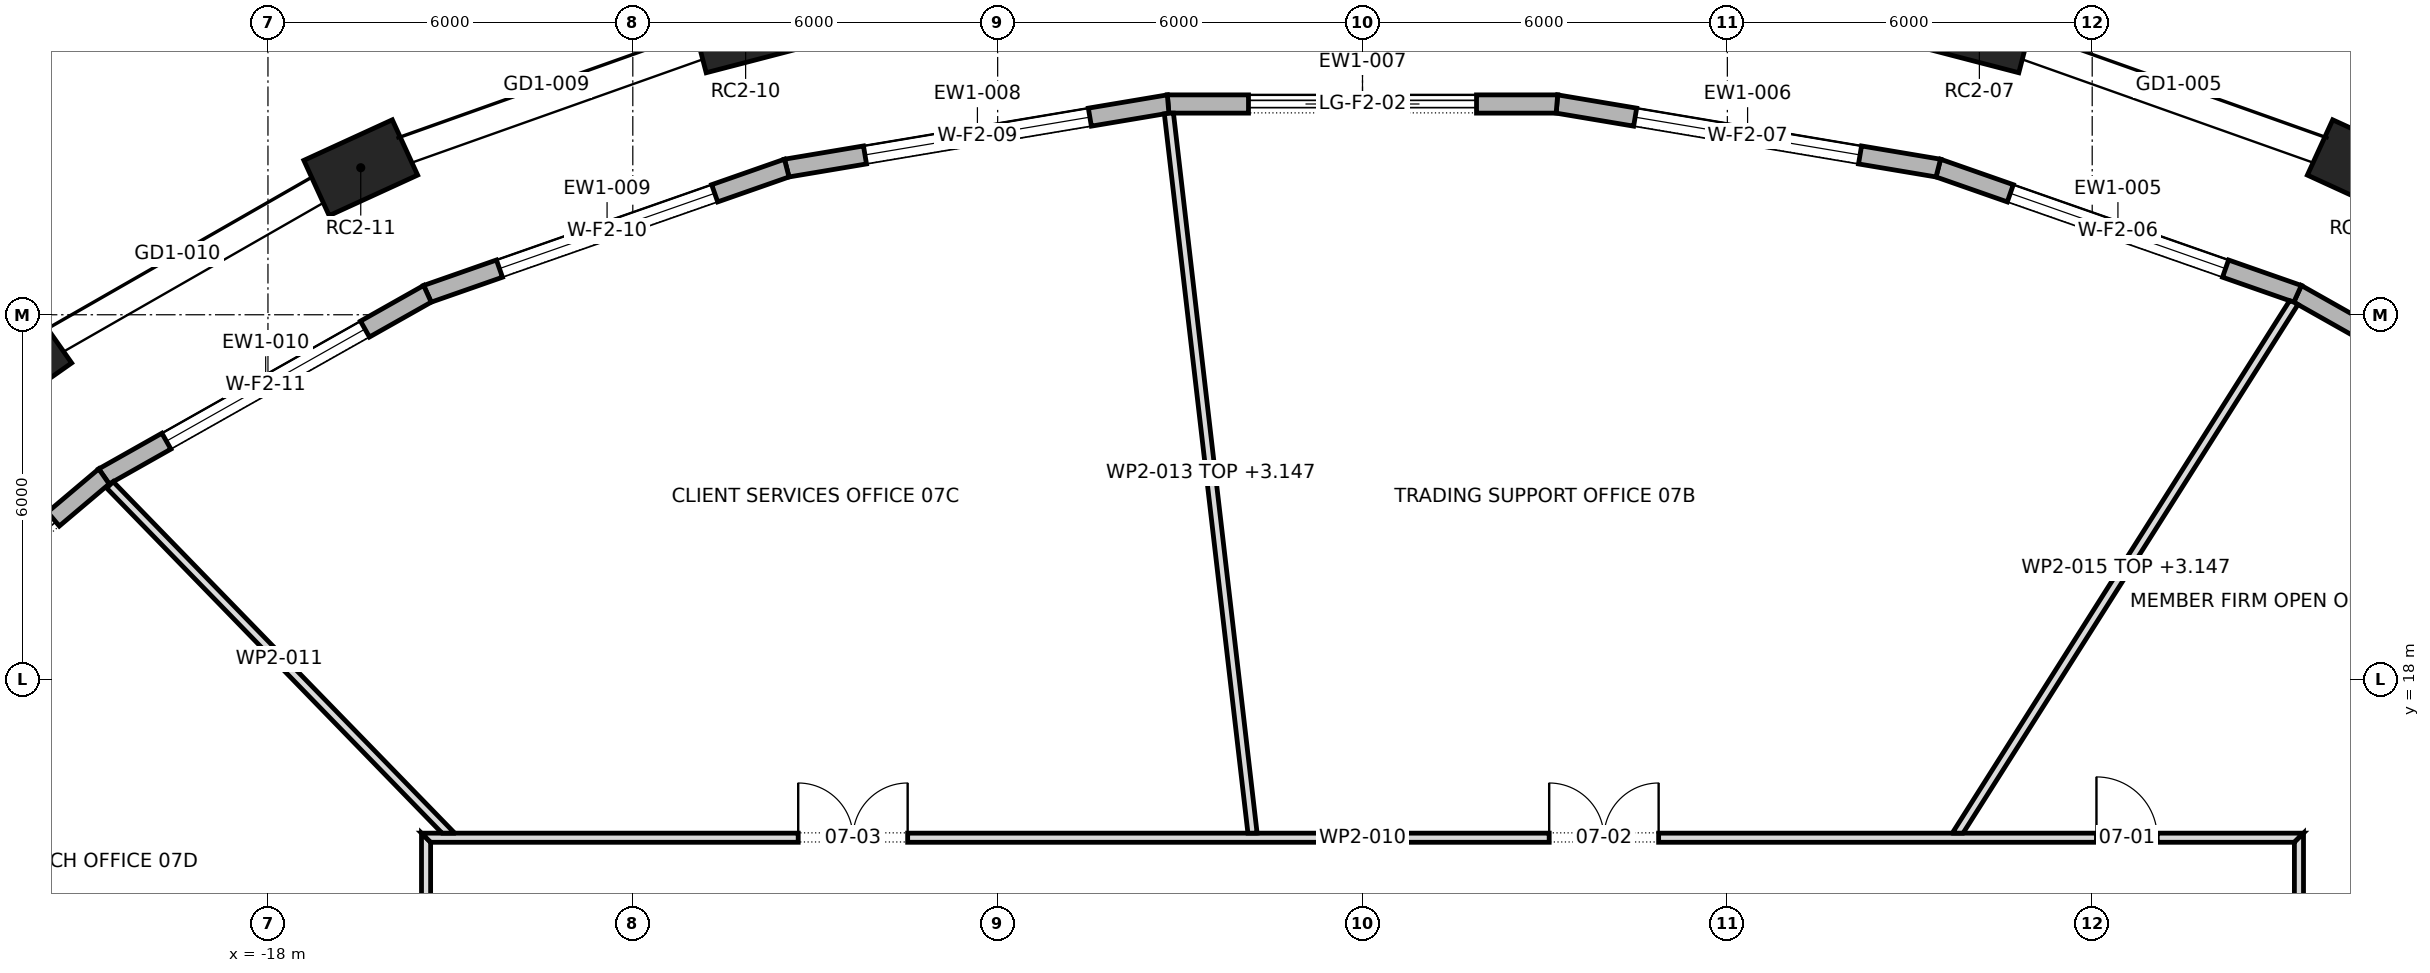
"""IFC4 building model, lengths in metres.
Left out: names, types, materials, properties, quantities, classifications, styles, units other than length and angle.
Written with IfcOpenShell. Run it as: python <this file> out.ifc"""

import sys

from ifc_helpers import new_model, si_unit, direction, frame, frame_2d, origin, origin_2d, place, context, subcontext, project, spatial, polyline, rectangle, outline, extrude, element, fill, save


model = new_model("IFC4")
c1 = context("Model", 3, precision=1e-05, world=origin(), true_north=direction((0.0, 1.0)))
c2 = subcontext(c1, "Body", "Model", "MODEL_VIEW")
j1 = project(units=[si_unit("LENGTHUNIT", "METRE"), si_unit("PLANEANGLEUNIT", "RADIAN")], contexts=[c1])
p1 = place(None, origin())
s1 = spatial("IfcSite", under=j1, at=p1, CompositionType="ELEMENT")
p2 = place(p1, origin())
s2 = spatial("IfcBuilding", under=s1, at=p2, CompositionType="ELEMENT")
p3 = place(p2, frame((0.0, 0.0, 112.9)))
s3 = spatial("IfcBuildingStorey", under=s2, at=p3, CompositionType="ELEMENT", Elevation=112.9)
for number, where, z_axis, x_axis in (
    (1, (16.474, 26.418, 0.0), (0.0, 0.0, 1.0), (-0.909, 0.417, 0.0)),
    (2, (10.145, 28.665, 0.0), (0.0, 0.0, 1.0), (-0.968, 0.252, 0.0)),
    (3, (-10.145, 28.665, 0.0), (0.0, 0.0, 1.0), (-0.968, -0.252, 0.0)),
    (4, (-16.474, 26.418, 0.0), (0.0, 0.0, 1.0), (-0.909, -0.417, 0.0)),
    (5, (-22.17, 23.156, 0.0), (0.0, 0.0, 1.0), (-0.818, -0.575, 0.0)),
):
    element("IfcColumn", number, at=place(p3, frame(where, z_axis=z_axis, x_axis=x_axis)), inside=s3, PredefinedType="COLUMN", context=c2, shape_type="SweptSolid", body=[
        extrude(rectangle(XDim=1.6, YDim=1.0, at=origin_2d()), origin(), (0.0, 0.0, 1.0), 4.2),
    ])
p4 = place(p3, frame((20.697, 21.341, 0.0), z_axis=(0.0, 0.0, 1.0), x_axis=(-0.870828448417, 0.491587035455, 0.0)))
e6 = element("IfcWall", 6, at=p4, inside=s3, PredefinedType="STANDARD", context=c2, shape_type="SweptSolid", body=[
    extrude(outline(polyline([(-0.014, -0.15), (6.122, -0.15), (6.095, 0.15), (0.014, 0.15), (-0.014, -0.15)])), origin(), (0.0, 0.0, 1.0), 3.9),
])
p5 = place(p4, frame((1.179, 0.0, 0.6)))
e7 = element("IfcOpeningElement", 7, at=p5, cuts=e6, PredefinedType="OPENING", context=c2, shape_type="SweptSolid", body=[
    extrude(rectangle(XDim=3.75, YDim=2.85, at=frame_2d((1.875, 1.425))), frame((0.0, 0.162, 0.0), z_axis=(0.0, -1.0, 0.0), x_axis=(1.0, 0.0, 0.0)), (0.0, 0.0, 1.0), 0.324),
])
p6 = place(p3, frame((15.377, 24.344, 0.0), z_axis=(0.0, 0.0, 1.0), x_axis=(-0.943866868202, 0.330326104193, 0.0)))
e8 = element("IfcWall", 8, at=p6, inside=s3, PredefinedType="STANDARD", context=c2, shape_type="SweptSolid", body=[
    extrude(outline(polyline([(-0.013, -0.15), (6.273, -0.15), (6.247, 0.15), (0.013, 0.15), (-0.013, -0.15)])), origin(), (0.0, 0.0, 1.0), 3.9),
])
p7 = place(p6, frame((1.255, 0.0, 0.6)))
e9 = element("IfcOpeningElement", 9, at=p7, cuts=e8, PredefinedType="OPENING", context=c2, shape_type="SweptSolid", body=[
    extrude(rectangle(XDim=3.75, YDim=2.85, at=frame_2d((1.875, 1.425))), frame((0.0, 0.162, 0.0), z_axis=(0.0, -1.0, 0.0), x_axis=(1.0, 0.0, 0.0)), (0.0, 0.0, 1.0), 0.324),
])
p8 = place(p3, frame((9.469, 26.412, 0.0), z_axis=(0.0, 0.0, 1.0), x_axis=(-0.986178310488, 0.165687476666, 0.0)))
e10 = element("IfcWall", 10, at=p8, inside=s3, PredefinedType="STANDARD", context=c2, shape_type="SweptSolid", body=[
    extrude(outline(polyline([(-0.013, -0.15), (6.372, -0.15), (6.347, 0.15), (0.013, 0.15), (-0.013, -0.15)])), origin(), (0.0, 0.0, 1.0), 3.9),
])
p9 = place(p8, frame((1.305, 0.0, 0.6)))
e11 = element("IfcOpeningElement", 11, at=p9, cuts=e10, PredefinedType="OPENING", context=c2, shape_type="SweptSolid", body=[
    extrude(rectangle(XDim=3.75, YDim=2.85, at=frame_2d((1.875, 1.425))), frame((0.0, 0.162, 0.0), z_axis=(0.0, -1.0, 0.0), x_axis=(1.0, 0.0, 0.0)), (0.0, 0.0, 1.0), 0.324),
])
p10 = place(p3, frame((3.197, 27.466, 0.0), z_axis=(0.0, 0.0, 1.0), x_axis=(-1.0, 0.0, 0.0)))
e12 = element("IfcWall", 12, at=p10, inside=s3, PredefinedType="STANDARD", context=c2, shape_type="SweptSolid", body=[
    extrude(outline(polyline([(-0.012, -0.15), (6.406, -0.15), (6.382, 0.15), (0.012, 0.15), (-0.012, -0.15)])), origin(), (0.0, 0.0, 1.0), 3.9),
])
p11 = place(p10, frame((1.322, 0.0, 0.0)))
e13 = element("IfcOpeningElement", 13, at=p11, cuts=e12, PredefinedType="OPENING", context=c2, shape_type="SweptSolid", body=[
    extrude(rectangle(XDim=3.75, YDim=3.45, at=frame_2d((1.875, 1.725))), frame((0.0, 0.162, 0.0), z_axis=(0.0, -1.0, 0.0), x_axis=(1.0, 0.0, 0.0)), (0.0, 0.0, 1.0), 0.324),
])
p12 = place(p3, frame((-3.197, 27.466, 0.0), z_axis=(0.0, 0.0, 1.0), x_axis=(-0.986178310488, -0.165687476666, 0.0)))
e14 = element("IfcWall", 14, at=p12, inside=s3, PredefinedType="STANDARD", context=c2, shape_type="SweptSolid", body=[
    extrude(outline(polyline([(-0.012, -0.15), (6.372, -0.15), (6.347, 0.15), (0.012, 0.15), (-0.012, -0.15)])), origin(), (0.0, 0.0, 1.0), 3.9),
])
p13 = place(p12, frame((1.305, 0.0, 0.6)))
e15 = element("IfcOpeningElement", 15, at=p13, cuts=e14, PredefinedType="OPENING", context=c2, shape_type="SweptSolid", body=[
    extrude(rectangle(XDim=3.75, YDim=2.85, at=frame_2d((1.875, 1.425))), frame((0.0, 0.162, 0.0), z_axis=(0.0, -1.0, 0.0), x_axis=(1.0, 0.0, 0.0)), (0.0, 0.0, 1.0), 0.324),
])
p14 = place(p3, frame((-9.469, 26.412, 0.0), z_axis=(0.0, 0.0, 1.0), x_axis=(-0.943866868202, -0.330326104193, 0.0)))
e16 = element("IfcWall", 16, at=p14, inside=s3, PredefinedType="STANDARD", context=c2, shape_type="SweptSolid", body=[
    extrude(outline(polyline([(-0.013, -0.15), (6.273, -0.15), (6.247, 0.15), (0.013, 0.15), (-0.013, -0.15)])), origin(), (0.0, 0.0, 1.0), 3.9),
])
p15 = place(p14, frame((1.255, 0.0, 0.6)))
e17 = element("IfcOpeningElement", 17, at=p15, cuts=e16, PredefinedType="OPENING", context=c2, shape_type="SweptSolid", body=[
    extrude(rectangle(XDim=3.75, YDim=2.85, at=frame_2d((1.875, 1.425))), frame((0.0, 0.162, 0.0), z_axis=(0.0, -1.0, 0.0), x_axis=(1.0, 0.0, 0.0)), (0.0, 0.0, 1.0), 0.324),
])
p16 = place(p3, frame((-15.377, 24.344, 0.0), z_axis=(0.0, 0.0, 1.0), x_axis=(-0.870828448417, -0.491587035455, 0.0)))
e18 = element("IfcWall", 18, at=p16, inside=s3, PredefinedType="STANDARD", context=c2, shape_type="SweptSolid", body=[
    extrude(outline(polyline([(-0.013, -0.15), (6.123, -0.15), (6.094, 0.15), (0.013, 0.15), (-0.013, -0.15)])), origin(), (0.0, 0.0, 1.0), 3.9),
])
p17 = place(p16, frame((1.179, 0.0, 0.6)))
e19 = element("IfcOpeningElement", 19, at=p17, cuts=e18, PredefinedType="OPENING", context=c2, shape_type="SweptSolid", body=[
    extrude(rectangle(XDim=3.75, YDim=2.85, at=frame_2d((1.875, 1.425))), frame((0.0, 0.162, 0.0), z_axis=(0.0, -1.0, 0.0), x_axis=(1.0, 0.0, 0.0)), (0.0, 0.0, 1.0), 0.324),
])
p18 = place(p3, frame((-20.697, 21.341, 0.0), z_axis=(0.0, 0.0, 1.0), x_axis=(-0.763894031266, -0.645341699409, 0.0)))
e20 = element("IfcWall", 20, at=p18, inside=s3, PredefinedType="STANDARD", context=c2, shape_type="SweptSolid", body=[
    extrude(outline(polyline([(-0.014, -0.15), (5.94, -0.15), (5.91, 0.15), (0.014, 0.15), (-0.014, -0.15)])), origin(), (0.0, 0.0, 1.0), 3.9),
])
p19 = place(p18, frame((1.087, 0.0, 0.0)))
e21 = element("IfcOpeningElement", 21, at=p19, cuts=e20, PredefinedType="OPENING", context=c2, shape_type="SweptSolid", body=[
    extrude(rectangle(XDim=3.75, YDim=3.45, at=frame_2d((1.875, 1.725))), frame((0.0, 0.162, 0.0), z_axis=(0.0, -1.0, 0.0), x_axis=(1.0, 0.0, 0.0)), (0.0, 0.0, 1.0), 0.324),
])
p20 = place(p3, frame((-15.4, -15.475, 0.0), z_axis=(0.0, 0.0, 1.0), x_axis=(0.0, 1.0, 0.0)))
e22 = element("IfcWall", 22, at=p20, inside=s3, PredefinedType="PARTITIONING", context=c2, shape_type="SweptSolid", body=[
    extrude(outline(polyline([(0.15, -0.075), (2.066, -0.075), (3.981, -0.075), (5.897, -0.075), (7.812, -0.075), (9.728, -0.075), (11.644, -0.075), (13.56, -0.075), (15.475, -0.075), (17.391, -0.075), (19.306, -0.075), (21.222, -0.075), (23.138, -0.075), (25.053, -0.075), (26.969, -0.075), (28.885, -0.075), (30.8, -0.075), (30.95, 0.075), (29.016, 0.075), (27.081, 0.075), (25.147, 0.075), (23.212, 0.075), (21.278, 0.075), (19.344, 0.075), (17.409, 0.075), (15.475, 0.075), (13.541, 0.075), (11.606, 0.075), (9.672, 0.075), (7.738, 0.075), (5.803, 0.075), (3.869, 0.075), (1.935, 0.075), (0.0, 0.075), (0.15, -0.075)])), origin(), (0.0, 0.0, 1.0), 3.9),
])
p21 = place(p20, frame((24.25, 0.0, 0.0)))
e23 = element("IfcOpeningElement", 23, at=p21, cuts=e22, PredefinedType="OPENING", context=c2, shape_type="SweptSolid", body=[
    extrude(rectangle(XDim=1.8, YDim=2.1, at=frame_2d((0.9, 1.05))), frame((0.0, 0.087, 0.0), z_axis=(0.0, -1.0, 0.0), x_axis=(1.0, 0.0, 0.0)), (0.0, 0.0, 1.0), 0.174),
])
p22 = place(p20, frame((6.735, 0.0, 0.0)))
e24 = element("IfcOpeningElement", 24, at=p22, cuts=e22, PredefinedType="OPENING", context=c2, shape_type="SweptSolid", body=[
    extrude(rectangle(XDim=1.0, YDim=2.1, at=frame_2d((0.5, 1.05))), frame((0.0, 0.087, 0.0), z_axis=(0.0, -1.0, 0.0), x_axis=(1.0, 0.0, 0.0)), (0.0, 0.0, 1.0), 0.174),
])
p23 = place(p20, frame((12.5, 0.0, 0.0)))
e25 = element("IfcOpeningElement", 25, at=p23, cuts=e22, PredefinedType="OPENING", context=c2, shape_type="SweptSolid", body=[
    extrude(rectangle(XDim=1.0, YDim=2.1, at=frame_2d((0.5, 1.05))), frame((0.0, 0.087, 0.0), z_axis=(0.0, -1.0, 0.0), x_axis=(1.0, 0.0, 0.0)), (0.0, 0.0, 1.0), 0.174),
])
p24 = place(p20, frame((17.375, 0.0, 0.0)))
e26 = element("IfcOpeningElement", 26, at=p24, cuts=e22, PredefinedType="OPENING", context=c2, shape_type="SweptSolid", body=[
    extrude(rectangle(XDim=1.0, YDim=2.1, at=frame_2d((0.5, 1.05))), frame((0.0, 0.087, 0.0), z_axis=(0.0, -1.0, 0.0), x_axis=(1.0, 0.0, 0.0)), (0.0, 0.0, 1.0), 0.174),
])
p25 = place(p3, frame((-15.475, 15.4, 0.0), z_axis=(0.0, 0.0, 1.0), x_axis=(1.0, 0.0, 0.0)))
e27 = element("IfcWall", 27, at=p25, inside=s3, PredefinedType="PARTITIONING", context=c2, shape_type="SweptSolid", body=[
    extrude(outline(polyline([(0.15, -0.075), (2.066, -0.075), (3.981, -0.075), (5.897, -0.075), (7.812, -0.075), (9.728, -0.075), (11.644, -0.075), (13.56, -0.075), (15.475, -0.075), (17.391, -0.075), (19.306, -0.075), (21.222, -0.075), (23.138, -0.075), (25.053, -0.075), (26.969, -0.075), (28.885, -0.075), (30.8, -0.075), (30.95, 0.075), (29.016, 0.075), (27.081, 0.075), (25.147, 0.075), (23.212, 0.075), (21.278, 0.075), (19.344, 0.075), (17.409, 0.075), (15.475, 0.075), (13.541, 0.075), (11.606, 0.075), (9.672, 0.075), (7.738, 0.075), (5.803, 0.075), (3.869, 0.075), (1.935, 0.075), (0.0, 0.075), (0.15, -0.075)])), origin(), (0.0, 0.0, 1.0), 3.9),
])
p26 = place(p25, frame((27.545, 0.0, 0.0)))
e28 = element("IfcOpeningElement", 28, at=p26, cuts=e27, PredefinedType="OPENING", context=c2, shape_type="SweptSolid", body=[
    extrude(rectangle(XDim=1.0, YDim=2.1, at=frame_2d((0.5, 1.05))), frame((0.0, 0.087, 0.0), z_axis=(0.0, -1.0, 0.0), x_axis=(1.0, 0.0, 0.0)), (0.0, 0.0, 1.0), 0.174),
])
p27 = place(p25, frame((18.545, 0.0, 0.0)))
e29 = element("IfcOpeningElement", 29, at=p27, cuts=e27, PredefinedType="OPENING", context=c2, shape_type="SweptSolid", body=[
    extrude(rectangle(XDim=1.8, YDim=2.1, at=frame_2d((0.9, 1.05))), frame((0.0, 0.087, 0.0), z_axis=(0.0, -1.0, 0.0), x_axis=(1.0, 0.0, 0.0)), (0.0, 0.0, 1.0), 0.174),
])
p28 = place(p25, frame((6.195, 0.0, 0.0)))
e30 = element("IfcOpeningElement", 30, at=p28, cuts=e27, PredefinedType="OPENING", context=c2, shape_type="SweptSolid", body=[
    extrude(rectangle(XDim=1.8, YDim=2.1, at=frame_2d((0.9, 1.05))), frame((0.0, 0.087, 0.0), z_axis=(0.0, -1.0, 0.0), x_axis=(1.0, 0.0, 0.0)), (0.0, 0.0, 1.0), 0.174),
])
p29 = place(p3, frame((-14.982, 15.423, 0.0), z_axis=(0.0, 0.0, 1.0), x_axis=(-0.696915710248, 0.717153046992, 0.0)))
e31 = element("IfcWall", 31, at=p29, inside=s3, PredefinedType="PARTITIONING", context=c2, shape_type="SweptSolid", body=[
    extrude(outline(polyline([(8.059, 0.075), (6.08, 0.075), (4.102, 0.075), (2.124, 0.075), (0.146, 0.075), (0.0, -0.075), (0.0, -0.075), (1.612, -0.075), (3.223, -0.075), (4.835, -0.075), (6.447, -0.075), (8.059, -0.075), (8.059, 0.075)])), origin(), (0.0, 0.0, 1.0), 3.9),
])
p30 = place(p3, frame((-1.808, 15.467, 0.0), z_axis=(0.0, 0.0, 1.0), x_axis=(-0.115425226741, 0.993316171736, 0.0)))
e32 = element("IfcWall", 32, at=p30, inside=s3, PredefinedType="PARTITIONING", context=c2, shape_type="SweptSolid", body=[
    extrude(outline(polyline([(0.0, -0.075), (1.987, -0.075), (3.973, -0.075), (5.96, -0.075), (7.947, -0.075), (9.934, -0.075), (11.92, -0.075), (11.925, -0.035), (11.925, 0.075), (9.94, 0.075), (7.956, 0.075), (5.971, 0.075), (3.987, 0.075), (2.002, 0.075), (0.017, 0.075), (0.0, -0.073), (0.0, -0.075)])), origin(), (0.0, 0.0, 1.0), 3.147),
])
p31 = place(p3, frame((9.762, 15.435, 0.0), z_axis=(0.0, 0.0, 1.0), x_axis=(0.535189090909, 0.844732287161, 0.0)))
e33 = element("IfcWall", 33, at=p31, inside=s3, PredefinedType="PARTITIONING", context=c2, shape_type="SweptSolid", body=[
    extrude(outline(polyline([(10.386, -0.075), (10.386, -0.069), (10.382, 0.004), (10.365, 0.075), (8.638, 0.075), (6.91, 0.075), (5.183, 0.075), (3.455, 0.075), (1.728, 0.075), (0.0, 0.075), (0.0, 0.075), (0.095, -0.075), (1.81, -0.075), (3.525, -0.075), (5.24, -0.075), (6.955, -0.075), (8.671, -0.075), (10.386, -0.075)])), origin(), (0.0, 0.0, 1.0), 3.147),
])
p32 = place(p3, frame((15.4, 2.88, 0.0), z_axis=(0.0, 0.0, 1.0), x_axis=(0.0, 1.0, 0.0)))
e34 = element("IfcWall", 34, at=p32, inside=s3, PredefinedType="PARTITIONING", context=c2, shape_type="SweptSolid", body=[
    extrude(outline(polyline([(0.0, -0.075), (1.799, -0.075), (3.599, -0.075), (5.398, -0.075), (7.197, -0.075), (8.996, -0.075), (10.796, -0.075), (12.595, -0.075), (12.445, 0.075), (10.667, 0.075), (8.889, 0.075), (7.112, 0.075), (5.333, 0.075), (3.556, 0.075), (1.778, 0.075), (0.0, 0.075), (0.0, -0.075)])), origin(), (0.0, 0.0, 1.0), 3.9),
])
p33 = place(p32, frame((3.4, 0.0, 0.0)))
e35 = element("IfcOpeningElement", 35, at=p33, cuts=e34, PredefinedType="OPENING", context=c2, shape_type="SweptSolid", body=[
    extrude(rectangle(XDim=1.0, YDim=2.1, at=frame_2d((0.5, 1.05))), frame((0.0, 0.087, 0.0), z_axis=(0.0, -1.0, 0.0), x_axis=(1.0, 0.0, 0.0)), (0.0, 0.0, 1.0), 0.174),
])
p34 = place(p3, frame((15.433, 10.702, 0.0), z_axis=(0.0, 0.0, 1.0), x_axis=(0.82202509952, 0.569451258458, 0.0)))
e36 = element("IfcWall", 36, at=p34, inside=s3, PredefinedType="PARTITIONING", context=c2, shape_type="SweptSolid", body=[
    extrude(outline(polyline([(0.0, -0.075), (1.635, -0.075), (3.269, -0.075), (4.904, -0.075), (6.538, -0.075), (6.54, -0.072), (6.544, -0.075), (8.291, -0.075), (10.038, -0.075), (11.785, -0.075), (11.785, -0.071), (11.78, 0.003), (11.761, 0.075), (9.818, 0.075), (7.875, 0.075), (5.932, 0.075), (3.989, 0.075), (2.046, 0.075), (0.104, 0.075), (0.0, -0.074), (0.0, -0.075)])), origin(), (0.0, 0.0, 1.0), 3.147),
])
p35 = place(p7, origin())
e37 = element("IfcWindow", 37, at=p35, inside=s3, PartitioningType="TRIPLE_PANEL_VERTICAL", PredefinedType="WINDOW", context=c2, shape_type="SweptSolid", body=[
    extrude(rectangle(XDim=3.75, YDim=2.85, at=frame_2d((1.875, 1.425))), frame((0.0, 0.03, 0.0), z_axis=(0.0, -1.0, 0.0), x_axis=(1.0, 0.0, 0.0)), (0.0, 0.0, 1.0), 0.06),
])
fill(e9, e37)
p36 = place(p9, origin())
e38 = element("IfcWindow", 38, at=p36, inside=s3, PartitioningType="TRIPLE_PANEL_VERTICAL", PredefinedType="WINDOW", context=c2, shape_type="SweptSolid", body=[
    extrude(rectangle(XDim=3.75, YDim=2.85, at=frame_2d((1.875, 1.425))), frame((0.0, 0.03, 0.0), z_axis=(0.0, -1.0, 0.0), x_axis=(1.0, 0.0, 0.0)), (0.0, 0.0, 1.0), 0.06),
])
fill(e11, e38)
p37 = place(p11, origin())
e39 = element("IfcDoor", 39, at=p37, inside=s3, OperationType="DOUBLE_DOOR_SLIDING", PredefinedType="DOOR", context=c2, shape_type="SweptSolid", body=[
    extrude(rectangle(XDim=3.75, YDim=3.45, at=frame_2d((1.875, 1.725))), frame((0.0, 0.025, 0.0), z_axis=(0.0, -1.0, 0.0), x_axis=(1.0, 0.0, 0.0)), (0.0, 0.0, 1.0), 0.05),
])
fill(e13, e39)
p38 = place(p13, origin())
e40 = element("IfcWindow", 40, at=p38, inside=s3, PartitioningType="TRIPLE_PANEL_VERTICAL", PredefinedType="WINDOW", context=c2, shape_type="SweptSolid", body=[
    extrude(rectangle(XDim=3.75, YDim=2.85, at=frame_2d((1.875, 1.425))), frame((0.0, 0.03, 0.0), z_axis=(0.0, -1.0, 0.0), x_axis=(1.0, 0.0, 0.0)), (0.0, 0.0, 1.0), 0.06),
])
fill(e15, e40)
p39 = place(p15, origin())
e41 = element("IfcWindow", 41, at=p39, inside=s3, PartitioningType="TRIPLE_PANEL_VERTICAL", PredefinedType="WINDOW", context=c2, shape_type="SweptSolid", body=[
    extrude(rectangle(XDim=3.75, YDim=2.85, at=frame_2d((1.875, 1.425))), frame((0.0, 0.03, 0.0), z_axis=(0.0, -1.0, 0.0), x_axis=(1.0, 0.0, 0.0)), (0.0, 0.0, 1.0), 0.06),
])
fill(e17, e41)
p40 = place(p17, origin())
e42 = element("IfcWindow", 42, at=p40, inside=s3, PartitioningType="TRIPLE_PANEL_VERTICAL", PredefinedType="WINDOW", context=c2, shape_type="SweptSolid", body=[
    extrude(rectangle(XDim=3.75, YDim=2.85, at=frame_2d((1.875, 1.425))), frame((0.0, 0.03, 0.0), z_axis=(0.0, -1.0, 0.0), x_axis=(1.0, 0.0, 0.0)), (0.0, 0.0, 1.0), 0.06),
])
fill(e19, e42)
p41 = place(p19, origin())
e43 = element("IfcDoor", 43, at=p41, inside=s3, OperationType="DOUBLE_DOOR_SLIDING", PredefinedType="DOOR", context=c2, shape_type="SweptSolid", body=[
    extrude(rectangle(XDim=3.75, YDim=3.45, at=frame_2d((1.875, 1.725))), frame((0.0, 0.025, 0.0), z_axis=(0.0, -1.0, 0.0), x_axis=(1.0, 0.0, 0.0)), (0.0, 0.0, 1.0), 0.05),
])
fill(e21, e43)
p42 = place(p26, origin())
e44 = element("IfcDoor", 44, at=p42, inside=s3, OperationType="SINGLE_SWING_RIGHT", PredefinedType="DOOR", context=c2, shape_type="SweptSolid", body=[
    extrude(rectangle(XDim=1.0, YDim=2.1, at=frame_2d((0.5, 1.05))), frame((0.0, 0.025, 0.0), z_axis=(0.0, -1.0, 0.0), x_axis=(1.0, 0.0, 0.0)), (0.0, 0.0, 1.0), 0.05),
])
fill(e28, e44)
p43 = place(p27, origin())
e45 = element("IfcDoor", 45, at=p43, inside=s3, OperationType="DOUBLE_DOOR_SINGLE_SWING", PredefinedType="DOOR", context=c2, shape_type="SweptSolid", body=[
    extrude(rectangle(XDim=1.8, YDim=2.1, at=frame_2d((0.9, 1.05))), frame((0.0, 0.025, 0.0), z_axis=(0.0, -1.0, 0.0), x_axis=(1.0, 0.0, 0.0)), (0.0, 0.0, 1.0), 0.05),
])
fill(e29, e45)
p44 = place(p28, origin())
e46 = element("IfcDoor", 46, at=p44, inside=s3, OperationType="DOUBLE_DOOR_SINGLE_SWING", PredefinedType="DOOR", context=c2, shape_type="SweptSolid", body=[
    extrude(rectangle(XDim=1.8, YDim=2.1, at=frame_2d((0.9, 1.05))), frame((0.0, 0.025, 0.0), z_axis=(0.0, -1.0, 0.0), x_axis=(1.0, 0.0, 0.0)), (0.0, 0.0, 1.0), 0.05),
])
fill(e30, e46)
save(model, sys.argv[1])
